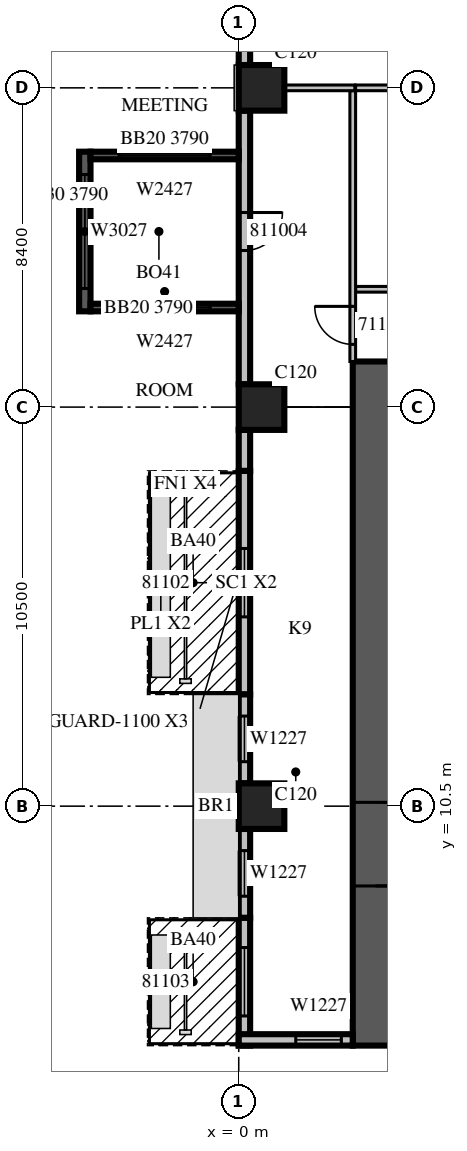
"""IFC4 building model, lengths in metres.
Left out: names, types, materials, properties, quantities, classifications, styles, units other than length and angle.
Written with IfcOpenShell. Run it as: python <this file> out.ifc"""

import sys

from ifc_helpers import new_model, si_unit, direction, frame, frame_2d, origin, origin_2d, place, context, subcontext, project, spatial, rectangle, extrude, source, transform, mapped, element, fill, save


model = new_model("IFC4")
c1 = context("Model", 3, precision=1e-05, world=origin(), true_north=direction((0.0, 1.0)))
c2 = subcontext(c1, "Body", "Model", "MODEL_VIEW")
j1 = project(units=[si_unit("LENGTHUNIT", "METRE"), si_unit("PLANEANGLEUNIT", "RADIAN")], contexts=[c1])
p1 = place(None, origin())
s1 = spatial("IfcSite", under=j1, at=p1, CompositionType="ELEMENT")
p2 = place(p1, origin())
s2 = spatial("IfcBuilding", under=s1, at=p2, CompositionType="ELEMENT")
p3 = place(p2, frame((0.0, 0.0, 57.3)))
s3 = spatial("IfcBuildingStorey", under=s2, at=p3, CompositionType="ELEMENT", Elevation=57.3)
m1 = source(origin(), c2, "Body", "SweptSolid", [
    extrude(rectangle(XDim=1.2, YDim=1.2, at=origin_2d()), origin(), (0.0, 0.0, 1.0), 4.2),
])
for number, where, z_axis, x_axis in (
    (1, (0.6, 10.5, 0.0), (0.0, 0.0, 1.0), (1.0, 0.0, 0.0)),
    (2, (0.6, 21.0, 0.0), (0.0, 0.0, 1.0), (1.0, 0.0, 0.0)),
    (3, (0.6, 29.4, 0.0), (0.0, 0.0, 1.0), (1.0, 0.0, 0.0)),
):
    element("IfcColumn", number, at=place(p3, frame(where, z_axis=z_axis, x_axis=x_axis)), inside=s3, PredefinedType="COLUMN", context=c2, shape_type="MappedRepresentation", body=[
        mapped(m1, transform((0.0, 0.0, 0.0), scale=1.0)),
    ])
m2 = source(origin(), c2, "Body", "SweptSolid", [
    extrude(rectangle(XDim=18.0, YDim=1.2, at=frame_2d((9.0, 0.0))), origin(), (0.0, 0.0, 1.0), 4.2),
])
p4 = place(p3, frame((3.6, 4.2, 0.0), z_axis=(0.0, 0.0, 1.0), x_axis=(0.0, 1.0, 0.0)))
e4 = element("IfcWall", 4, at=p4, inside=s3, PredefinedType="SHEAR", context=c2, shape_type="MappedRepresentation", body=[
    mapped(m2, transform((0.0, 0.0, 0.0), scale=1.0)),
])
m3 = source(origin(), c2, "Body", "SweptSolid", [
    extrude(rectangle(XDim=2.2, YDim=2.1, at=frame_2d((1.1, 1.05))), frame((0.0, 0.61, 0.0), z_axis=(0.0, -1.0, 0.0), x_axis=(1.0, 0.0, 0.0)), (0.0, 0.0, 1.0), 1.22),
])
p5 = place(p4, frame((4.2, 0.0, 0.0)))
e5 = element("IfcOpeningElement", 5, at=p5, cuts=e4, PredefinedType="OPENING", context=c2, shape_type="MappedRepresentation", body=[
    mapped(m3, transform((0.0, 0.0, 0.0), scale=1.0)),
])
m4 = source(origin(), c2, "Body", "SweptSolid", [
    extrude(rectangle(XDim=7.2, YDim=0.3, at=frame_2d((3.6, 0.0))), origin(), (0.0, 0.0, 1.0), 3.8),
])
p6 = place(p3, frame((0.15, 37.2, 0.0), z_axis=(0.0, 0.0, 1.0), x_axis=(0.0, -1.0, 0.0)))
e6 = element("IfcWall", 6, at=p6, inside=s3, PredefinedType="STANDARD", context=c2, shape_type="MappedRepresentation", body=[
    mapped(m4, transform((0.0, 0.0, 0.0), scale=1.0)),
])
m5 = source(origin(), c2, "Body", "SweptSolid", [
    extrude(rectangle(XDim=1.8, YDim=2.7, at=frame_2d((0.9, 1.35))), frame((0.0, 0.16, 0.0), z_axis=(0.0, -1.0, 0.0), x_axis=(1.0, 0.0, 0.0)), (0.0, 0.0, 1.0), 0.32),
])
p7 = place(p6, frame((0.738, 0.0, 0.6)))
e7 = element("IfcOpeningElement", 7, at=p7, cuts=e6, PredefinedType="OPENING", context=c2, shape_type="MappedRepresentation", body=[
    mapped(m5, transform((0.0, 0.0, 0.0), scale=1.0)),
])
p8 = place(p6, frame((4.175, 0.0, 0.6)))
e8 = element("IfcOpeningElement", 8, at=p8, cuts=e6, PredefinedType="OPENING", context=c2, shape_type="MappedRepresentation", body=[
    mapped(m5, transform((0.0, 0.0, 0.0), scale=1.0)),
])
p9 = place(p3, frame((0.15, 28.8, 0.0), z_axis=(0.0, 0.0, 1.0), x_axis=(0.0, -1.0, 0.0)))
e9 = element("IfcWall", 9, at=p9, inside=s3, PredefinedType="STANDARD", context=c2, shape_type="MappedRepresentation", body=[
    mapped(m4, transform((0.0, 0.0, 0.0), scale=1.0)),
])
m6 = source(origin(), c2, "Body", "SweptSolid", [
    extrude(rectangle(XDim=1.0, YDim=2.1, at=frame_2d((0.5, 1.05))), frame((0.0, 0.16, 0.0), z_axis=(0.0, -1.0, 0.0), x_axis=(1.0, 0.0, 0.0)), (0.0, 0.0, 1.0), 0.32),
])
p10 = place(p9, frame((2.68, 0.0, 0.0)))
e10 = element("IfcOpeningElement", 10, at=p10, cuts=e9, PredefinedType="OPENING", context=c2, shape_type="MappedRepresentation", body=[
    mapped(m6, transform((0.0, 0.0, 0.0), scale=1.0)),
])
m7 = source(origin(), c2, "Body", "SweptSolid", [
    extrude(rectangle(XDim=1.08, YDim=0.3, at=frame_2d((0.54, 0.0))), origin(), (0.0, 0.0, 1.0), 3.8),
])
p11 = place(p3, frame((0.15, 20.4, 0.0), z_axis=(0.0, 0.0, 1.0), x_axis=(0.0, -1.0, 0.0)))
e11 = element("IfcWall", 11, at=p11, inside=s3, PredefinedType="STANDARD", context=c2, shape_type="MappedRepresentation", body=[
    mapped(m7, transform((0.0, 0.0, 0.0), scale=1.0)),
])
m8 = source(origin(), c2, "Body", "SweptSolid", [
    extrude(rectangle(XDim=5.88, YDim=0.3, at=frame_2d((2.94, 0.0))), origin(), (0.0, 0.0, 1.0), 3.8),
])
p12 = place(p3, frame((0.15, 19.32, 0.0), z_axis=(0.0, 0.0, 1.0), x_axis=(0.0, -1.0, 0.0)))
e12 = element("IfcWall", 12, at=p12, inside=s3, PredefinedType="STANDARD", context=c2, shape_type="MappedRepresentation", body=[
    mapped(m8, transform((0.0, 0.0, 0.0), scale=1.0)),
])
m9 = source(origin(), c2, "Body", "SweptSolid", [
    extrude(rectangle(XDim=1.8, YDim=2.4, at=frame_2d((0.9, 1.2))), frame((0.0, 0.16, 0.0), z_axis=(0.0, -1.0, 0.0), x_axis=(1.0, 0.0, 0.0)), (0.0, 0.0, 1.0), 0.32),
])
p13 = place(p12, frame((2.04, 0.0, 0.0)))
e13 = element("IfcOpeningElement", 13, at=p13, cuts=e12, PredefinedType="OPENING", context=c2, shape_type="MappedRepresentation", body=[
    mapped(m9, transform((0.0, 0.0, 0.0), scale=1.0)),
])
m10 = source(origin(), c2, "Body", "SweptSolid", [
    extrude(rectangle(XDim=2.34, YDim=0.3, at=frame_2d((1.17, 0.0))), origin(), (0.0, 0.0, 1.0), 3.8),
])
p14 = place(p3, frame((0.15, 13.44, 0.0), z_axis=(0.0, 0.0, 1.0), x_axis=(0.0, -1.0, 0.0)))
e14 = element("IfcWall", 14, at=p14, inside=s3, PredefinedType="STANDARD", context=c2, shape_type="MappedRepresentation", body=[
    mapped(m10, transform((0.0, 0.0, 0.0), scale=1.0)),
])
m11 = source(origin(), c2, "Body", "SweptSolid", [
    extrude(rectangle(XDim=1.2, YDim=2.7, at=frame_2d((0.6, 1.35))), frame((0.0, 0.16, 0.0), z_axis=(0.0, -1.0, 0.0), x_axis=(1.0, 0.0, 0.0)), (0.0, 0.0, 1.0), 0.32),
])
p15 = place(p14, frame((0.57, 0.0, 0.6)))
e15 = element("IfcOpeningElement", 15, at=p15, cuts=e14, PredefinedType="OPENING", context=c2, shape_type="MappedRepresentation", body=[
    mapped(m11, transform((0.0, 0.0, 0.0), scale=1.0)),
])
p16 = place(p3, frame((0.15, 9.9, 0.0), z_axis=(0.0, 0.0, 1.0), x_axis=(0.0, -1.0, 0.0)))
e16 = element("IfcWall", 16, at=p16, inside=s3, PredefinedType="STANDARD", context=c2, shape_type="MappedRepresentation", body=[
    mapped(m10, transform((0.0, 0.0, 0.0), scale=1.0)),
])
p17 = place(p16, frame((0.57, 0.0, 0.6)))
e17 = element("IfcOpeningElement", 17, at=p17, cuts=e16, PredefinedType="OPENING", context=c2, shape_type="MappedRepresentation", body=[
    mapped(m11, transform((0.0, 0.0, 0.0), scale=1.0)),
])
m12 = source(origin(), c2, "Body", "SweptSolid", [
    extrude(rectangle(XDim=3.36, YDim=0.3, at=frame_2d((1.68, 0.0))), origin(), (0.0, 0.0, 1.0), 3.8),
])
p18 = place(p3, frame((0.15, 7.56, 0.0), z_axis=(0.0, 0.0, 1.0), x_axis=(0.0, -1.0, 0.0)))
e18 = element("IfcWall", 18, at=p18, inside=s3, PredefinedType="STANDARD", context=c2, shape_type="MappedRepresentation", body=[
    mapped(m12, transform((0.0, 0.0, 0.0), scale=1.0)),
])
p19 = place(p18, frame((0.78, 0.0, 0.0)))
e19 = element("IfcOpeningElement", 19, at=p19, cuts=e18, PredefinedType="OPENING", context=c2, shape_type="MappedRepresentation", body=[
    mapped(m9, transform((0.0, 0.0, 0.0), scale=1.0)),
])
m13 = source(origin(), c2, "Body", "SweptSolid", [
    extrude(rectangle(XDim=3.0, YDim=0.3, at=frame_2d((1.5, 0.0))), origin(), (0.0, 0.0, 1.0), 3.8),
])
p20 = place(p3, frame((0.0, 4.35, 0.0), z_axis=(0.0, 0.0, 1.0), x_axis=(1.0, 0.0, 0.0)))
e20 = element("IfcWall", 20, at=p20, inside=s3, PredefinedType="STANDARD", context=c2, shape_type="MappedRepresentation", body=[
    mapped(m13, transform((0.0, 0.0, 0.0), scale=1.0)),
])
p21 = place(p20, frame((1.5, 0.0, 0.6)))
e21 = element("IfcOpeningElement", 21, at=p21, cuts=e20, PredefinedType="OPENING", context=c2, shape_type="MappedRepresentation", body=[
    mapped(m11, transform((0.0, 0.0, 0.0), scale=1.0)),
])
m14 = source(origin(), c2, "Body", "SweptSolid", [
    extrude(rectangle(XDim=4.2, YDim=0.3, at=frame_2d((2.1, 0.0))), origin(), (0.0, 0.0, 1.0), 3.79),
])
p22 = place(p3, frame((-4.05, 27.72, 0.0), z_axis=(0.0, 0.0, 1.0), x_axis=(0.0, -1.0, 0.0)))
e22 = element("IfcWall", 22, at=p22, inside=s3, PredefinedType="SOLIDWALL", context=c2, shape_type="MappedRepresentation", body=[
    mapped(m14, transform((0.0, 0.0, 0.0), scale=1.0)),
])
m15 = source(origin(), c2, "Body", "SweptSolid", [
    extrude(rectangle(XDim=3.0, YDim=2.7, at=frame_2d((1.5, 1.35))), frame((0.0, 0.16, 0.0), z_axis=(0.0, -1.0, 0.0), x_axis=(1.0, 0.0, 0.0)), (0.0, 0.0, 1.0), 0.32),
])
p23 = place(p22, frame((0.6, 0.0, 0.6)))
e23 = element("IfcOpeningElement", 23, at=p23, cuts=e22, PredefinedType="OPENING", context=c2, shape_type="MappedRepresentation", body=[
    mapped(m15, transform((0.0, 0.0, 0.0), scale=1.0)),
])
m16 = source(origin(), c2, "Body", "SweptSolid", [
    extrude(rectangle(XDim=3.9, YDim=0.2, at=frame_2d((1.95, 0.0))), origin(), (0.0, 0.0, 1.0), 3.79),
])
p24 = place(p3, frame((0.0, 27.62, 0.0), z_axis=(0.0, 0.0, 1.0), x_axis=(-1.0, 0.0, 0.0)))
e24 = element("IfcWall", 24, at=p24, inside=s3, PredefinedType="SOLIDWALL", context=c2, shape_type="MappedRepresentation", body=[
    mapped(m16, transform((0.0, 0.0, 0.0), scale=1.0)),
])
m17 = source(origin(), c2, "Body", "SweptSolid", [
    extrude(rectangle(XDim=2.4, YDim=2.7, at=frame_2d((1.2, 1.35))), frame((0.0, 0.11, 0.0), z_axis=(0.0, -1.0, 0.0), x_axis=(1.0, 0.0, 0.0)), (0.0, 0.0, 1.0), 0.22),
])
p25 = place(p24, frame((0.75, 0.0, 0.6)))
e25 = element("IfcOpeningElement", 25, at=p25, cuts=e24, PredefinedType="OPENING", context=c2, shape_type="MappedRepresentation", body=[
    mapped(m17, transform((0.0, 0.0, 0.0), scale=1.0)),
])
p26 = place(p3, frame((0.0, 23.62, 0.0), z_axis=(0.0, 0.0, 1.0), x_axis=(-1.0, 0.0, 0.0)))
e26 = element("IfcWall", 26, at=p26, inside=s3, PredefinedType="SOLIDWALL", context=c2, shape_type="MappedRepresentation", body=[
    mapped(m16, transform((0.0, 0.0, 0.0), scale=1.0)),
])
p27 = place(p26, frame((0.75, 0.0, 0.6)))
e27 = element("IfcOpeningElement", 27, at=p27, cuts=e26, PredefinedType="OPENING", context=c2, shape_type="MappedRepresentation", body=[
    mapped(m17, transform((0.0, 0.0, 0.0), scale=1.0)),
])
p28 = place(p3, frame((3.075, 24.1, 0.0), z_axis=(0.0, 0.0, 1.0), x_axis=(1.0, 0.0, 0.0)))
e28 = element("IfcWall", 28, at=p28, inside=s3, PredefinedType="PARTITIONING", context=c2, shape_type="SweptSolid", body=[
    extrude(rectangle(XDim=11.625, YDim=0.15, at=frame_2d((5.812, 0.0))), origin(), (0.0, 0.0, 1.0), 2.8),
])
m18 = source(origin(), c2, "Body", "SweptSolid", [
    extrude(rectangle(XDim=0.9, YDim=2.1, at=frame_2d((0.45, 1.05))), frame((0.0, 0.085, 0.0), z_axis=(0.0, -1.0, 0.0), x_axis=(1.0, 0.0, 0.0)), (0.0, 0.0, 1.0), 0.17),
])
p29 = place(p28, frame((3.263, 0.0, 0.0)))
e29 = element("IfcOpeningElement", 29, at=p29, cuts=e28, PredefinedType="OPENING", context=c2, shape_type="MappedRepresentation", body=[
    mapped(m18, transform((0.0, 0.0, 0.0), scale=1.0)),
])
p30 = place(p28, frame((9.95, 0.0, 0.0)))
e30 = element("IfcOpeningElement", 30, at=p30, cuts=e28, PredefinedType="OPENING", context=c2, shape_type="MappedRepresentation", body=[
    mapped(m18, transform((0.0, 0.0, 0.0), scale=1.0)),
])
m19 = source(origin(), c2, "Body", "SweptSolid", [
    extrude(rectangle(XDim=6.826, YDim=0.15, at=frame_2d((3.413, 0.0))), origin(), (0.0, 0.0, 1.0), 3.8),
])
p31 = place(p3, frame((9.901, 29.4, 0.0), z_axis=(0.0, 0.0, 1.0), x_axis=(-1.0, 0.0, 0.0)))
e31 = element("IfcWall", 31, at=p31, inside=s3, PredefinedType="PARTITIONING", context=c2, shape_type="MappedRepresentation", body=[
    mapped(m19, transform((0.0, 0.0, 0.0), scale=1.0)),
])
m20 = source(origin(), c2, "Body", "SweptSolid", [
    extrude(rectangle(XDim=7.125, YDim=0.15, at=frame_2d((3.562, 0.0))), origin(), (0.0, 0.0, 1.0), 3.8),
])
p32 = place(p3, frame((3.0, 29.325, 0.0), z_axis=(0.0, 0.0, 1.0), x_axis=(0.0, -1.0, 0.0)))
e32 = element("IfcWall", 32, at=p32, inside=s3, PredefinedType="PARTITIONING", context=c2, shape_type="MappedRepresentation", body=[
    mapped(m20, transform((0.0, 0.0, 0.0), scale=1.0)),
])
m21 = source(origin(), c2, "Body", "SweptSolid", [
    extrude(rectangle(XDim=1.0, YDim=2.1, at=frame_2d((0.5, 1.05))), frame((0.0, 0.085, 0.0), z_axis=(0.0, -1.0, 0.0), x_axis=(1.0, 0.0, 0.0)), (0.0, 0.0, 1.0), 0.17),
])
p33 = place(p32, frame((5.675, 0.0, 0.0)))
e33 = element("IfcOpeningElement", 33, at=p33, cuts=e32, PredefinedType="OPENING", context=c2, shape_type="MappedRepresentation", body=[
    mapped(m21, transform((0.0, 0.0, 0.0), scale=1.0)),
])
m22 = source(origin(), c2, "Body", "SweptSolid", [
    extrude(rectangle(XDim=1.856, YDim=0.15, at=frame_2d((0.928, 0.0))), origin(), (0.0, 0.0, 1.0), 3.8),
])
p34 = place(p3, frame((3.055, 29.4, 0.0), z_axis=(0.0, 0.0, 1.0), x_axis=(-1.0, 0.0, 0.0)))
e34 = element("IfcWall", 34, at=p34, inside=s3, PredefinedType="PARTITIONING", context=c2, shape_type="MappedRepresentation", body=[
    mapped(m22, transform((0.0, 0.0, 0.0), scale=1.0)),
])
m23 = source(origin(), c2, "Body", "SweptSolid", [
    extrude(rectangle(XDim=1.8, YDim=2.4, at=frame_2d((0.9, 1.2))), frame((0.0, 0.025, 0.0), z_axis=(0.0, -1.0, 0.0), x_axis=(1.0, 0.0, 0.0)), (0.0, 0.0, 1.0), 0.05),
])
p35 = place(p13, origin())
e35 = element("IfcDoor", 35, at=p35, inside=s3, OperationType="SLIDING_TO_LEFT", PredefinedType="DOOR", context=c2, shape_type="MappedRepresentation", body=[
    mapped(m23, transform((0.0, 0.0, 0.0), scale=1.0)),
])
fill(e13, e35)
m24 = source(origin(), c2, "Body", "SweptSolid", [
    extrude(rectangle(XDim=1.2, YDim=2.7, at=frame_2d((0.6, 1.35))), frame((0.0, 0.03, 0.0), z_axis=(0.0, -1.0, 0.0), x_axis=(1.0, 0.0, 0.0)), (0.0, 0.0, 1.0), 0.06),
])
p36 = place(p15, origin())
e36 = element("IfcWindow", 36, at=p36, inside=s3, PartitioningType="SINGLE_PANEL", PredefinedType="WINDOW", context=c2, shape_type="MappedRepresentation", body=[
    mapped(m24, transform((0.0, 0.0, 0.0), scale=1.0)),
])
fill(e15, e36)
p37 = place(p17, origin())
e37 = element("IfcWindow", 37, at=p37, inside=s3, PartitioningType="SINGLE_PANEL", PredefinedType="WINDOW", context=c2, shape_type="MappedRepresentation", body=[
    mapped(m24, transform((0.0, 0.0, 0.0), scale=1.0)),
])
fill(e17, e37)
p38 = place(p19, origin())
e38 = element("IfcDoor", 38, at=p38, inside=s3, OperationType="SLIDING_TO_LEFT", PredefinedType="DOOR", context=c2, shape_type="MappedRepresentation", body=[
    mapped(m23, transform((0.0, 0.0, 0.0), scale=1.0)),
])
fill(e19, e38)
p39 = place(p21, origin())
e39 = element("IfcWindow", 39, at=p39, inside=s3, PartitioningType="SINGLE_PANEL", PredefinedType="WINDOW", context=c2, shape_type="MappedRepresentation", body=[
    mapped(m24, transform((0.0, 0.0, 0.0), scale=1.0)),
])
fill(e21, e39)
m25 = source(origin(), c2, "Body", "SweptSolid", [
    extrude(rectangle(XDim=3.0, YDim=2.7, at=frame_2d((1.5, 1.35))), frame((0.0, 0.03, 0.0), z_axis=(0.0, -1.0, 0.0), x_axis=(1.0, 0.0, 0.0)), (0.0, 0.0, 1.0), 0.06),
])
p40 = place(p23, origin())
e40 = element("IfcWindow", 40, at=p40, inside=s3, PartitioningType="SINGLE_PANEL", PredefinedType="WINDOW", context=c2, shape_type="MappedRepresentation", body=[
    mapped(m25, transform((0.0, 0.0, 0.0), scale=1.0)),
])
fill(e23, e40)
m26 = source(origin(), c2, "Body", "SweptSolid", [
    extrude(rectangle(XDim=2.4, YDim=2.7, at=frame_2d((1.2, 1.35))), frame((0.0, 0.03, 0.0), z_axis=(0.0, -1.0, 0.0), x_axis=(1.0, 0.0, 0.0)), (0.0, 0.0, 1.0), 0.06),
])
p41 = place(p25, origin())
e41 = element("IfcWindow", 41, at=p41, inside=s3, PartitioningType="SINGLE_PANEL", PredefinedType="WINDOW", context=c2, shape_type="MappedRepresentation", body=[
    mapped(m26, transform((0.0, 0.0, 0.0), scale=1.0)),
])
fill(e25, e41)
p42 = place(p27, origin())
e42 = element("IfcWindow", 42, at=p42, inside=s3, PartitioningType="SINGLE_PANEL", PredefinedType="WINDOW", context=c2, shape_type="MappedRepresentation", body=[
    mapped(m26, transform((0.0, 0.0, 0.0), scale=1.0)),
])
fill(e27, e42)
m27 = source(origin(), c2, "Body", "SweptSolid", [
    extrude(rectangle(XDim=2.2, YDim=2.1, at=frame_2d((1.1, 1.05))), frame((0.0, 0.025, 0.0), z_axis=(0.0, -1.0, 0.0), x_axis=(1.0, 0.0, 0.0)), (0.0, 0.0, 1.0), 0.05),
])
p43 = place(p5, origin())
e43 = element("IfcDoor", 43, at=p43, inside=s3, OperationType="DOUBLE_DOOR_SINGLE_SWING", PredefinedType="DOOR", context=c2, shape_type="MappedRepresentation", body=[
    mapped(m27, transform((0.0, 0.0, 0.0), scale=1.0)),
])
fill(e5, e43)
m28 = source(origin(), c2, "Body", "SweptSolid", [
    extrude(rectangle(XDim=1.0, YDim=2.1, at=frame_2d((0.5, 1.05))), frame((0.0, 0.025, 0.0), z_axis=(0.0, -1.0, 0.0), x_axis=(1.0, 0.0, 0.0)), (0.0, 0.0, 1.0), 0.05),
])
p44 = place(p33, origin())
e44 = element("IfcDoor", 44, at=p44, inside=s3, OperationType="SINGLE_SWING_RIGHT", PredefinedType="DOOR", context=c2, shape_type="MappedRepresentation", body=[
    mapped(m28, transform((0.0, 0.0, 0.0), scale=1.0)),
])
fill(e33, e44)
p45 = place(p10, origin())
e45 = element("IfcDoor", 45, at=p45, inside=s3, OperationType="SINGLE_SWING_LEFT", PredefinedType="DOOR", context=c2, shape_type="MappedRepresentation", body=[
    mapped(m28, transform((0.0, 0.0, 0.0), scale=1.0)),
])
fill(e10, e45)
save(model, sys.argv[1])
